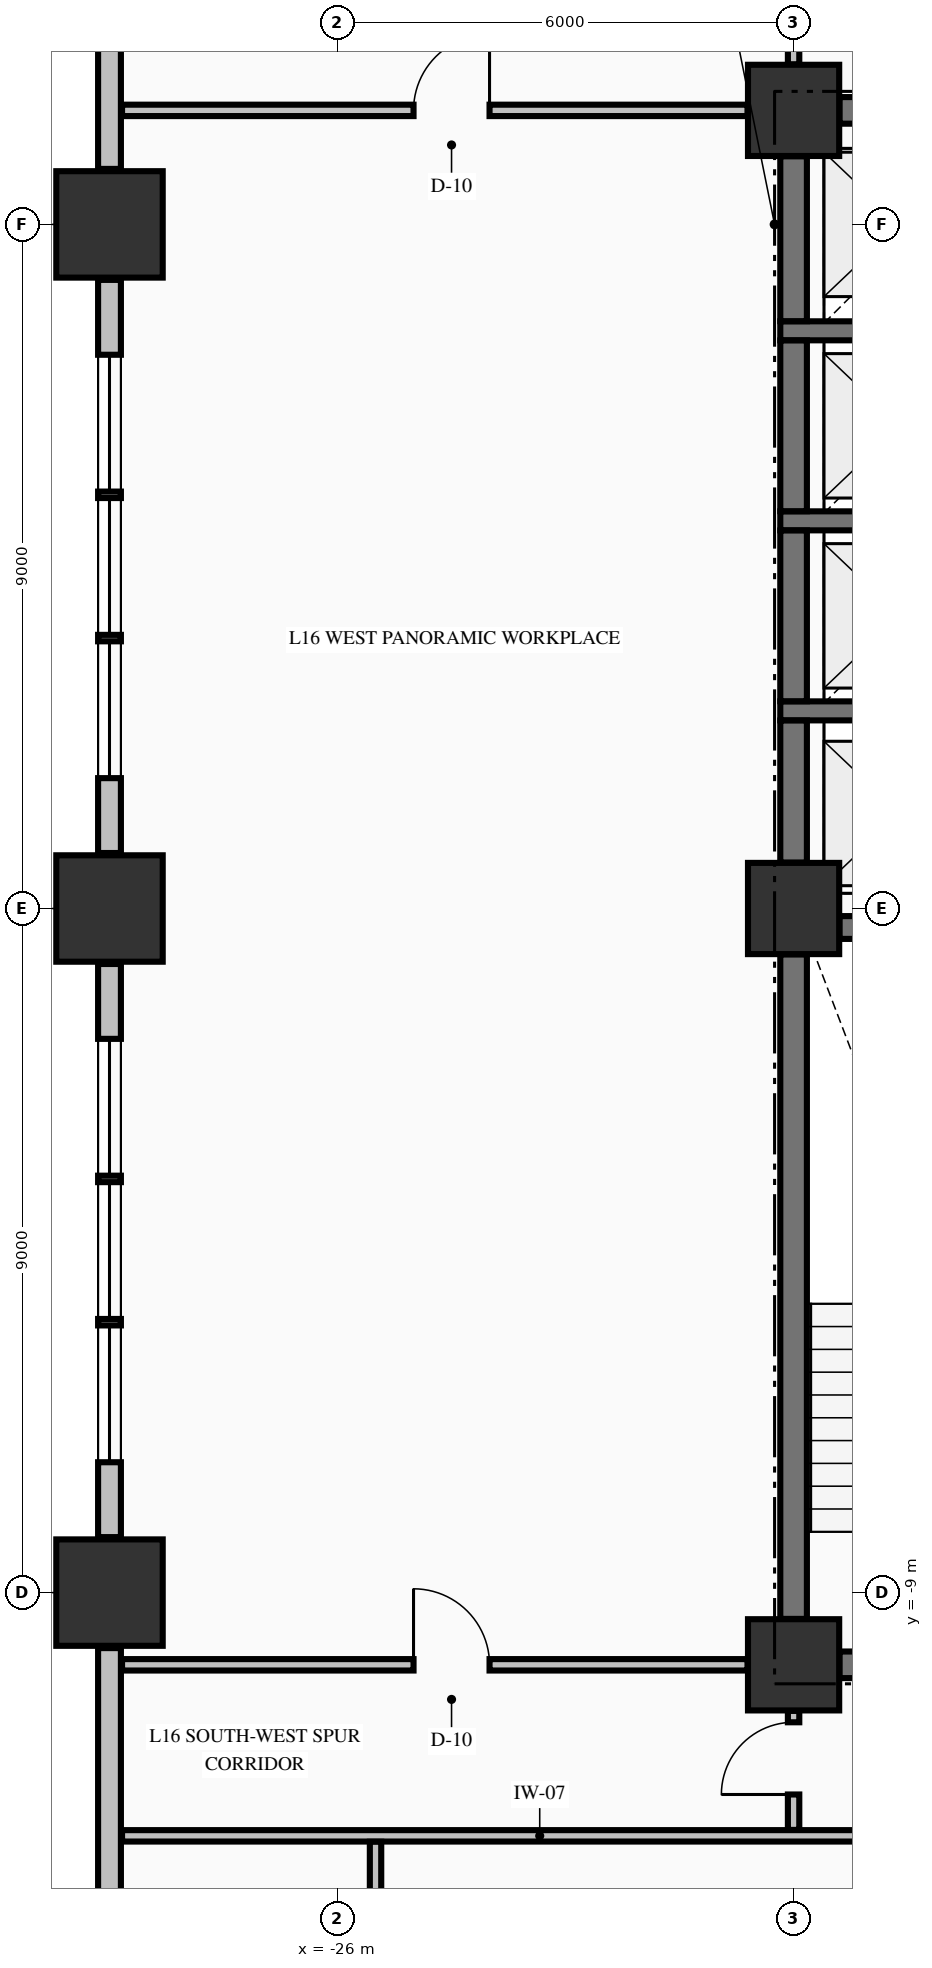
"""IFC4 building model, lengths in metres.
Left out: names, types, materials, properties, quantities, classifications, styles, units other than length and angle.
Written with IfcOpenShell. Run it as: python <this file> out.ifc"""

import sys

from ifc_helpers import new_model, si_unit, direction, frame, frame_2d, origin, origin_2d, place, context, subcontext, project, spatial, rectangle, extrude, element, fill, save


model = new_model("IFC4")
c1 = context("Model", 3, precision=1e-05, world=origin(), true_north=direction((0.0, 1.0)))
c2 = subcontext(c1, "Body", "Model", "MODEL_VIEW")
j1 = project(units=[si_unit("LENGTHUNIT", "METRE"), si_unit("PLANEANGLEUNIT", "RADIAN")], contexts=[c1])
p1 = place(None, origin())
s1 = spatial("IfcSite", under=j1, at=p1, CompositionType="ELEMENT")
p2 = place(p1, origin())
s2 = spatial("IfcBuilding", under=s1, at=p2, CompositionType="ELEMENT")
p3 = place(p2, frame((0.0, 0.0, 67.9)))
s3 = spatial("IfcBuildingStorey", under=s2, at=p3, CompositionType="ELEMENT", Elevation=67.9)
for number, where, z_axis, x_axis in (
    (1, (-29.0, -9.0, -0.25), (0.0, 0.0, 1.0), (1.0, 0.0, 0.0)),
    (2, (-29.0, 0.0, -0.25), (0.0, 0.0, 1.0), (1.0, 0.0, 0.0)),
    (3, (-29.0, 9.0, -0.25), (0.0, 0.0, 1.0), (1.0, 0.0, 0.0)),
):
    element("IfcColumn", number, at=place(p3, frame(where, z_axis=z_axis, x_axis=x_axis)), inside=s3, PredefinedType="COLUMN", context=c2, shape_type="SweptSolid", body=[
        extrude(rectangle(XDim=1.4, YDim=1.4, at=origin_2d()), origin(), (0.0, 0.0, 1.0), 3.495),
    ])
for number, where, z_axis, x_axis in (
    (4, (-20.0, -9.95, -0.25), (0.0, 0.0, 1.0), (1.0, 0.0, 0.0)),
    (5, (-20.0, 10.5, -0.25), (0.0, 0.0, 1.0), (1.0, 0.0, 0.0)),
    (6, (-20.0, 0.0, -0.25), (0.0, 0.0, 1.0), (1.0, 0.0, 0.0)),
):
    element("IfcColumn", number, at=place(p3, frame(where, z_axis=z_axis, x_axis=x_axis)), inside=s3, PredefinedType="COLUMN", context=c2, shape_type="SweptSolid", body=[
        extrude(rectangle(XDim=1.2, YDim=1.2, at=origin_2d()), origin(), (0.0, 0.0, 1.0), 3.495),
    ])
p4 = place(p3, frame((-29.0, -9.73, 0.0), z_axis=(0.0, 0.0, 1.0), x_axis=(0.0, -1.0, 0.0)))
e7 = element("IfcWall", 7, at=p4, inside=s3, PredefinedType="STANDARD", context=c2, shape_type="SweptSolid", body=[
    extrude(rectangle(XDim=12.54, YDim=0.3, at=frame_2d((6.27, 0.0))), origin(), (0.0, 0.0, 1.0), 2.637),
])
p5 = place(p3, frame((-29.0, -0.73, 0.0), z_axis=(0.0, 0.0, 1.0), x_axis=(0.0, -1.0, 0.0)))
e8 = element("IfcWall", 8, at=p5, inside=s3, PredefinedType="STANDARD", context=c2, shape_type="SweptSolid", body=[
    extrude(rectangle(XDim=7.54, YDim=0.3, at=frame_2d((3.77, 0.0))), origin(), (0.0, 0.0, 1.0), 2.637),
])
p6 = place(p5, frame((0.985, 0.0, 0.78)))
e9 = element("IfcOpeningElement", 9, at=p6, cuts=e8, PredefinedType="OPENING", context=c2, shape_type="SweptSolid", body=[
    extrude(rectangle(XDim=1.8, YDim=1.72, at=frame_2d((0.9, 0.86))), frame((0.0, 0.16, 0.0), z_axis=(0.0, -1.0, 0.0), x_axis=(1.0, 0.0, 0.0)), (0.0, 0.0, 1.0), 0.32),
])
p7 = place(p5, frame((2.87, 0.0, 0.78)))
e10 = element("IfcOpeningElement", 10, at=p7, cuts=e8, PredefinedType="OPENING", context=c2, shape_type="SweptSolid", body=[
    extrude(rectangle(XDim=1.8, YDim=1.72, at=frame_2d((0.9, 0.86))), frame((0.0, 0.16, 0.0), z_axis=(0.0, -1.0, 0.0), x_axis=(1.0, 0.0, 0.0)), (0.0, 0.0, 1.0), 0.32),
])
p8 = place(p5, frame((4.755, 0.0, 0.78)))
e11 = element("IfcOpeningElement", 11, at=p8, cuts=e8, PredefinedType="OPENING", context=c2, shape_type="SweptSolid", body=[
    extrude(rectangle(XDim=1.8, YDim=1.72, at=frame_2d((0.9, 0.86))), frame((0.0, 0.16, 0.0), z_axis=(0.0, -1.0, 0.0), x_axis=(1.0, 0.0, 0.0)), (0.0, 0.0, 1.0), 0.32),
])
p9 = place(p3, frame((-29.0, 8.27, 0.0), z_axis=(0.0, 0.0, 1.0), x_axis=(0.0, -1.0, 0.0)))
e12 = element("IfcWall", 12, at=p9, inside=s3, PredefinedType="STANDARD", context=c2, shape_type="SweptSolid", body=[
    extrude(rectangle(XDim=7.54, YDim=0.3, at=frame_2d((3.77, 0.0))), origin(), (0.0, 0.0, 1.0), 2.637),
])
p10 = place(p9, frame((0.985, 0.0, 0.78)))
e13 = element("IfcOpeningElement", 13, at=p10, cuts=e12, PredefinedType="OPENING", context=c2, shape_type="SweptSolid", body=[
    extrude(rectangle(XDim=1.8, YDim=1.72, at=frame_2d((0.9, 0.86))), frame((0.0, 0.16, 0.0), z_axis=(0.0, -1.0, 0.0), x_axis=(1.0, 0.0, 0.0)), (0.0, 0.0, 1.0), 0.32),
])
p11 = place(p9, frame((2.87, 0.0, 0.78)))
e14 = element("IfcOpeningElement", 14, at=p11, cuts=e12, PredefinedType="OPENING", context=c2, shape_type="SweptSolid", body=[
    extrude(rectangle(XDim=1.8, YDim=1.72, at=frame_2d((0.9, 0.86))), frame((0.0, 0.16, 0.0), z_axis=(0.0, -1.0, 0.0), x_axis=(1.0, 0.0, 0.0)), (0.0, 0.0, 1.0), 0.32),
])
p12 = place(p9, frame((4.755, 0.0, 0.78)))
e15 = element("IfcOpeningElement", 15, at=p12, cuts=e12, PredefinedType="OPENING", context=c2, shape_type="SweptSolid", body=[
    extrude(rectangle(XDim=1.8, YDim=1.72, at=frame_2d((0.9, 0.86))), frame((0.0, 0.16, 0.0), z_axis=(0.0, -1.0, 0.0), x_axis=(1.0, 0.0, 0.0)), (0.0, 0.0, 1.0), 0.32),
])
p13 = place(p3, frame((-29.0, 22.27, 0.0), z_axis=(0.0, 0.0, 1.0), x_axis=(0.0, -1.0, 0.0)))
e16 = element("IfcWall", 16, at=p13, inside=s3, PredefinedType="STANDARD", context=c2, shape_type="SweptSolid", body=[
    extrude(rectangle(XDim=12.54, YDim=0.3, at=frame_2d((6.27, 0.0))), origin(), (0.0, 0.0, 1.0), 2.637),
])
p14 = place(p3, frame((-19.396, -9.95, 0.0), z_axis=(0.0, 0.0, 1.0), x_axis=(1.0, 0.0, 0.0)))
e17 = element("IfcWall", 17, at=p14, inside=s3, PredefinedType="SHEAR", context=c2, shape_type="SweptSolid", body=[
    extrude(rectangle(XDim=4.696, YDim=0.35, at=frame_2d((2.348, 0.0))), origin(), (0.0, 0.0, 1.0), 3.245),
])
p15 = place(p14, frame((0.571, 0.0, 0.0)))
e18 = element("IfcOpeningElement", 18, at=p15, cuts=e17, PredefinedType="OPENING", context=c2, shape_type="SweptSolid", body=[
    extrude(rectangle(XDim=1.05, YDim=2.15, at=frame_2d((0.525, 1.075))), frame((0.0, 0.185, 0.0), z_axis=(0.0, -1.0, 0.0), x_axis=(1.0, 0.0, 0.0)), (0.0, 0.0, 1.0), 0.37),
])
p16 = place(p3, frame((-19.396, -0.25, 0.0), z_axis=(0.0, 0.0, 1.0), x_axis=(1.0, 0.0, 0.0)))
e19 = element("IfcWall", 19, at=p16, inside=s3, PredefinedType="SHEAR", context=c2, shape_type="SweptSolid", body=[
    extrude(rectangle(XDim=7.792, YDim=0.3, at=frame_2d((3.896, 0.0))), origin(), (0.0, 0.0, 1.0), 3.245),
])
p17 = place(p16, frame((5.696, 0.0, 0.0)))
e20 = element("IfcOpeningElement", 20, at=p17, cuts=e19, PredefinedType="OPENING", context=c2, shape_type="SweptSolid", body=[
    extrude(rectangle(XDim=1.1, YDim=2.15, at=frame_2d((0.55, 1.075))), frame((0.0, 0.16, 0.0), z_axis=(0.0, -1.0, 0.0), x_axis=(1.0, 0.0, 0.0)), (0.0, 0.0, 1.0), 0.32),
])
for number, where, z_axis, x_axis in (
    (21, (-20.175, 2.6, 0.0), (0.0, 0.0, 1.0), (1.0, 0.0, 0.0)),
    (22, (-20.175, 5.1, 0.0), (0.0, 0.0, 1.0), (1.0, 0.0, 0.0)),
    (23, (-20.175, 7.6, 0.0), (0.0, 0.0, 1.0), (1.0, 0.0, 0.0)),
):
    element("IfcWall", number, at=place(p3, frame(where, z_axis=z_axis, x_axis=x_axis)), inside=s3, PredefinedType="SOLIDWALL", context=c2, shape_type="SweptSolid", body=[
        extrude(rectangle(XDim=3.1, YDim=0.25, at=frame_2d((1.55, 0.0))), origin(), (0.0, 0.0, 1.0), 3.245),
    ])
p18 = place(p3, frame((-19.396, 10.5, 0.0), z_axis=(0.0, 0.0, 1.0), x_axis=(1.0, 0.0, 0.0)))
e24 = element("IfcWall", 24, at=p18, inside=s3, PredefinedType="SHEAR", context=c2, shape_type="SweptSolid", body=[
    extrude(rectangle(XDim=4.696, YDim=0.35, at=frame_2d((2.348, 0.0))), origin(), (0.0, 0.0, 1.0), 3.245),
])
p19 = place(p18, frame((2.796, 0.0, 0.0)))
e25 = element("IfcOpeningElement", 25, at=p19, cuts=e24, PredefinedType="OPENING", context=c2, shape_type="SweptSolid", body=[
    extrude(rectangle(XDim=1.2, YDim=2.15, at=frame_2d((0.6, 1.075))), frame((0.0, 0.185, 0.0), z_axis=(0.0, -1.0, 0.0), x_axis=(1.0, 0.0, 0.0)), (0.0, 0.0, 1.0), 0.37),
])
p20 = place(p3, frame((-28.835, -12.2, 0.0), z_axis=(0.0, 0.0, 1.0), x_axis=(1.0, 0.0, 0.0)))
e26 = element("IfcWall", 26, at=p20, inside=s3, PredefinedType="PARTITIONING", context=c2, shape_type="SweptSolid", body=[
    extrude(rectangle(XDim=52.67, YDim=0.15, at=frame_2d((26.335, 0.0))), origin(), (0.0, 0.0, 1.0), 3.245),
])
p21 = place(p20, frame((10.99, 0.0, 0.0)))
e27 = element("IfcOpeningElement", 27, at=p21, cuts=e26, PredefinedType="OPENING", context=c2, shape_type="SweptSolid", body=[
    extrude(rectangle(XDim=1.05, YDim=2.15, at=frame_2d((0.525, 1.075))), frame((0.0, 0.085, 0.0), z_axis=(0.0, -1.0, 0.0), x_axis=(1.0, 0.0, 0.0)), (0.0, 0.0, 1.0), 0.17),
])
p22 = place(p20, frame((18.86, 0.0, 0.0)))
e28 = element("IfcOpeningElement", 28, at=p22, cuts=e26, PredefinedType="OPENING", context=c2, shape_type="SweptSolid", body=[
    extrude(rectangle(XDim=0.95, YDim=2.15, at=frame_2d((0.475, 1.075))), frame((0.0, 0.085, 0.0), z_axis=(0.0, -1.0, 0.0), x_axis=(1.0, 0.0, 0.0)), (0.0, 0.0, 1.0), 0.17),
])
p23 = place(p20, frame((23.21, 0.0, 0.0)))
e29 = element("IfcOpeningElement", 29, at=p23, cuts=e26, PredefinedType="OPENING", context=c2, shape_type="SweptSolid", body=[
    extrude(rectangle(XDim=0.95, YDim=2.15, at=frame_2d((0.475, 1.075))), frame((0.0, 0.085, 0.0), z_axis=(0.0, -1.0, 0.0), x_axis=(1.0, 0.0, 0.0)), (0.0, 0.0, 1.0), 0.17),
])
p24 = place(p20, frame((27.56, 0.0, 0.0)))
e30 = element("IfcOpeningElement", 30, at=p24, cuts=e26, PredefinedType="OPENING", context=c2, shape_type="SweptSolid", body=[
    extrude(rectangle(XDim=0.95, YDim=2.15, at=frame_2d((0.475, 1.075))), frame((0.0, 0.085, 0.0), z_axis=(0.0, -1.0, 0.0), x_axis=(1.0, 0.0, 0.0)), (0.0, 0.0, 1.0), 0.17),
])
p25 = place(p20, frame((36.86, 0.0, 0.0)))
e31 = element("IfcOpeningElement", 31, at=p25, cuts=e26, PredefinedType="OPENING", context=c2, shape_type="SweptSolid", body=[
    extrude(rectangle(XDim=1.05, YDim=2.15, at=frame_2d((0.525, 1.075))), frame((0.0, 0.085, 0.0), z_axis=(0.0, -1.0, 0.0), x_axis=(1.0, 0.0, 0.0)), (0.0, 0.0, 1.0), 0.17),
])
p26 = place(p20, frame((44.84, 0.0, 0.0)))
e32 = element("IfcOpeningElement", 32, at=p26, cuts=e26, PredefinedType="OPENING", context=c2, shape_type="SweptSolid", body=[
    extrude(rectangle(XDim=0.95, YDim=2.15, at=frame_2d((0.475, 1.075))), frame((0.0, 0.085, 0.0), z_axis=(0.0, -1.0, 0.0), x_axis=(1.0, 0.0, 0.0)), (0.0, 0.0, 1.0), 0.17),
])
p27 = place(p3, frame((-28.835, -9.95, 0.0), z_axis=(0.0, 0.0, 1.0), x_axis=(1.0, 0.0, 0.0)))
e33 = element("IfcWall", 33, at=p27, inside=s3, PredefinedType="PARTITIONING", context=c2, shape_type="SweptSolid", body=[
    extrude(rectangle(XDim=8.229, YDim=0.15, at=frame_2d((4.115, 0.0))), origin(), (0.0, 0.0, 1.0), 3.245),
])
p28 = place(p27, frame((3.835, 0.0, 0.0)))
e34 = element("IfcOpeningElement", 34, at=p28, cuts=e33, PredefinedType="OPENING", context=c2, shape_type="SweptSolid", body=[
    extrude(rectangle(XDim=1.0, YDim=2.15, at=frame_2d((0.5, 1.075))), frame((0.0, 0.085, 0.0), z_axis=(0.0, -1.0, 0.0), x_axis=(1.0, 0.0, 0.0)), (0.0, 0.0, 1.0), 0.17),
])
p29 = place(p3, frame((-28.835, 10.5, 0.0), z_axis=(0.0, 0.0, 1.0), x_axis=(1.0, 0.0, 0.0)))
e35 = element("IfcWall", 35, at=p29, inside=s3, PredefinedType="PARTITIONING", context=c2, shape_type="SweptSolid", body=[
    extrude(rectangle(XDim=8.229, YDim=0.15, at=frame_2d((4.115, 0.0))), origin(), (0.0, 0.0, 1.0), 3.245),
])
p30 = place(p29, frame((3.835, 0.0, 0.0)))
e36 = element("IfcOpeningElement", 36, at=p30, cuts=e35, PredefinedType="OPENING", context=c2, shape_type="SweptSolid", body=[
    extrude(rectangle(XDim=1.0, YDim=2.15, at=frame_2d((0.5, 1.075))), frame((0.0, 0.085, 0.0), z_axis=(0.0, -1.0, 0.0), x_axis=(1.0, 0.0, 0.0)), (0.0, 0.0, 1.0), 0.17),
])
p31 = place(p3, frame((-20.0, -9.346, 0.0), z_axis=(0.0, 0.0, 1.0), x_axis=(0.0, 1.0, 0.0)))
e37 = element("IfcWall", 37, at=p31, inside=s3, PredefinedType="SHEAR", context=c2, shape_type="SweptSolid", body=[
    extrude(rectangle(XDim=8.742, YDim=0.35, at=frame_2d((4.371, 0.0))), origin(), (0.0, 0.0, 1.0), 3.245),
])
p32 = place(p3, frame((-20.0, 0.604, 0.0), z_axis=(0.0, 0.0, 1.0), x_axis=(0.0, 1.0, 0.0)))
e38 = element("IfcWall", 38, at=p32, inside=s3, PredefinedType="SHEAR", context=c2, shape_type="SweptSolid", body=[
    extrude(rectangle(XDim=1.869, YDim=0.35, at=frame_2d((0.935, 0.0))), origin(), (0.0, 0.0, 1.0), 3.245),
])
for number, where, z_axis, x_axis in (
    (39, (-20.0, 2.727, 0.0), (0.0, 0.0, 1.0), (0.0, 1.0, 0.0)),
    (40, (-20.0, 5.227, 0.0), (0.0, 0.0, 1.0), (0.0, 1.0, 0.0)),
):
    element("IfcWall", number, at=place(p3, frame(where, z_axis=z_axis, x_axis=x_axis)), inside=s3, PredefinedType="SHEAR", context=c2, shape_type="SweptSolid", body=[
        extrude(rectangle(XDim=2.246, YDim=0.35, at=frame_2d((1.123, 0.0))), origin(), (0.0, 0.0, 1.0), 3.245),
    ])
p33 = place(p3, frame((-20.0, 7.727, 0.0), z_axis=(0.0, 0.0, 1.0), x_axis=(0.0, 1.0, 0.0)))
e41 = element("IfcWall", 41, at=p33, inside=s3, PredefinedType="SHEAR", context=c2, shape_type="SweptSolid", body=[
    extrude(rectangle(XDim=2.169, YDim=0.35, at=frame_2d((1.084, 0.0))), origin(), (0.0, 0.0, 1.0), 3.245),
])
p34 = place(p3, frame((-25.5, -22.294, 0.0), z_axis=(0.0, 0.0, 1.0), x_axis=(0.0, 1.0, 0.0)))
e42 = element("IfcWall", 42, at=p34, inside=s3, PredefinedType="PARTITIONING", context=c2, shape_type="SweptSolid", body=[
    extrude(rectangle(XDim=10.016, YDim=0.15, at=frame_2d((5.008, 0.0))), origin(), (0.0, 0.0, 1.0), 3.245),
])
p35 = place(p3, frame((-20.0, -12.122, 0.0), z_axis=(0.0, 0.0, 1.0), x_axis=(0.0, 1.0, 0.0)))
e43 = element("IfcWall", 43, at=p35, inside=s3, PredefinedType="PARTITIONING", context=c2, shape_type="SweptSolid", body=[
    extrude(rectangle(XDim=1.566, YDim=0.15, at=frame_2d((0.783, 0.0))), origin(), (0.0, 0.0, 1.0), 2.585),
])
p36 = place(p35, frame((0.466, 0.0, 0.0)))
e44 = element("IfcOpeningElement", 44, at=p36, cuts=e43, PredefinedType="OPENING", context=c2, shape_type="SweptSolid", body=[
    extrude(rectangle(XDim=0.95, YDim=2.15, at=frame_2d((0.475, 1.075))), frame((0.0, 0.085, 0.0), z_axis=(0.0, -1.0, 0.0), x_axis=(1.0, 0.0, 0.0)), (0.0, 0.0, 1.0), 0.17),
])
p37 = place(p3, frame((-20.0, 11.106, 0.0), z_axis=(0.0, 0.0, 1.0), x_axis=(0.0, 1.0, 0.0)))
e45 = element("IfcWall", 45, at=p37, inside=s3, PredefinedType="PARTITIONING", context=c2, shape_type="SweptSolid", body=[
    extrude(rectangle(XDim=2.366, YDim=0.15, at=frame_2d((1.183, 0.0))), origin(), (0.0, 0.0, 1.0), 2.585),
])
p38 = place(p37, frame((0.449, 0.0, 0.0)))
e46 = element("IfcOpeningElement", 46, at=p38, cuts=e45, PredefinedType="OPENING", context=c2, shape_type="SweptSolid", body=[
    extrude(rectangle(XDim=0.95, YDim=2.15, at=frame_2d((0.475, 1.075))), frame((0.0, 0.085, 0.0), z_axis=(0.0, -1.0, 0.0), x_axis=(1.0, 0.0, 0.0)), (0.0, 0.0, 1.0), 0.17),
])
p39 = place(p6, origin())
e47 = element("IfcWindow", 47, at=p39, inside=s3, PartitioningType="SINGLE_PANEL", PredefinedType="WINDOW", context=c2, shape_type="SweptSolid", body=[
    extrude(rectangle(XDim=1.8, YDim=1.72, at=frame_2d((0.9, 0.86))), frame((0.0, 0.03, 0.0), z_axis=(0.0, -1.0, 0.0), x_axis=(1.0, 0.0, 0.0)), (0.0, 0.0, 1.0), 0.06),
])
fill(e9, e47)
p40 = place(p7, origin())
e48 = element("IfcWindow", 48, at=p40, inside=s3, PartitioningType="SINGLE_PANEL", PredefinedType="WINDOW", context=c2, shape_type="SweptSolid", body=[
    extrude(rectangle(XDim=1.8, YDim=1.72, at=frame_2d((0.9, 0.86))), frame((0.0, 0.03, 0.0), z_axis=(0.0, -1.0, 0.0), x_axis=(1.0, 0.0, 0.0)), (0.0, 0.0, 1.0), 0.06),
])
fill(e10, e48)
p41 = place(p8, origin())
e49 = element("IfcWindow", 49, at=p41, inside=s3, PartitioningType="SINGLE_PANEL", PredefinedType="WINDOW", context=c2, shape_type="SweptSolid", body=[
    extrude(rectangle(XDim=1.8, YDim=1.72, at=frame_2d((0.9, 0.86))), frame((0.0, 0.03, 0.0), z_axis=(0.0, -1.0, 0.0), x_axis=(1.0, 0.0, 0.0)), (0.0, 0.0, 1.0), 0.06),
])
fill(e11, e49)
p42 = place(p10, origin())
e50 = element("IfcWindow", 50, at=p42, inside=s3, PartitioningType="SINGLE_PANEL", PredefinedType="WINDOW", context=c2, shape_type="SweptSolid", body=[
    extrude(rectangle(XDim=1.8, YDim=1.72, at=frame_2d((0.9, 0.86))), frame((0.0, 0.03, 0.0), z_axis=(0.0, -1.0, 0.0), x_axis=(1.0, 0.0, 0.0)), (0.0, 0.0, 1.0), 0.06),
])
fill(e13, e50)
p43 = place(p11, origin())
e51 = element("IfcWindow", 51, at=p43, inside=s3, PartitioningType="SINGLE_PANEL", PredefinedType="WINDOW", context=c2, shape_type="SweptSolid", body=[
    extrude(rectangle(XDim=1.8, YDim=1.72, at=frame_2d((0.9, 0.86))), frame((0.0, 0.03, 0.0), z_axis=(0.0, -1.0, 0.0), x_axis=(1.0, 0.0, 0.0)), (0.0, 0.0, 1.0), 0.06),
])
fill(e14, e51)
p44 = place(p12, origin())
e52 = element("IfcWindow", 52, at=p44, inside=s3, PartitioningType="SINGLE_PANEL", PredefinedType="WINDOW", context=c2, shape_type="SweptSolid", body=[
    extrude(rectangle(XDim=1.8, YDim=1.72, at=frame_2d((0.9, 0.86))), frame((0.0, 0.03, 0.0), z_axis=(0.0, -1.0, 0.0), x_axis=(1.0, 0.0, 0.0)), (0.0, 0.0, 1.0), 0.06),
])
fill(e15, e52)
p45 = place(p36, origin())
e53 = element("IfcDoor", 53, at=p45, inside=s3, OperationType="SINGLE_SWING_LEFT", PredefinedType="DOOR", context=c2, shape_type="SweptSolid", body=[
    extrude(rectangle(XDim=0.95, YDim=2.15, at=frame_2d((0.475, 1.075))), frame((0.0, 0.025, 0.0), z_axis=(0.0, -1.0, 0.0), x_axis=(1.0, 0.0, 0.0)), (0.0, 0.0, 1.0), 0.05),
])
fill(e44, e53)
p46 = place(p30, origin())
e54 = element("IfcDoor", 54, at=p46, inside=s3, OperationType="SINGLE_SWING_RIGHT", PredefinedType="DOOR", context=c2, shape_type="SweptSolid", body=[
    extrude(rectangle(XDim=1.0, YDim=2.15, at=frame_2d((0.5, 1.075))), frame((0.0, 0.025, 0.0), z_axis=(0.0, -1.0, 0.0), x_axis=(1.0, 0.0, 0.0)), (0.0, 0.0, 1.0), 0.05),
])
fill(e36, e54)
p47 = place(p28, origin())
e55 = element("IfcDoor", 55, at=p47, inside=s3, OperationType="SINGLE_SWING_LEFT", PredefinedType="DOOR", context=c2, shape_type="SweptSolid", body=[
    extrude(rectangle(XDim=1.0, YDim=2.15, at=frame_2d((0.5, 1.075))), frame((0.0, 0.025, 0.0), z_axis=(0.0, -1.0, 0.0), x_axis=(1.0, 0.0, 0.0)), (0.0, 0.0, 1.0), 0.05),
])
fill(e34, e55)
save(model, sys.argv[1])
